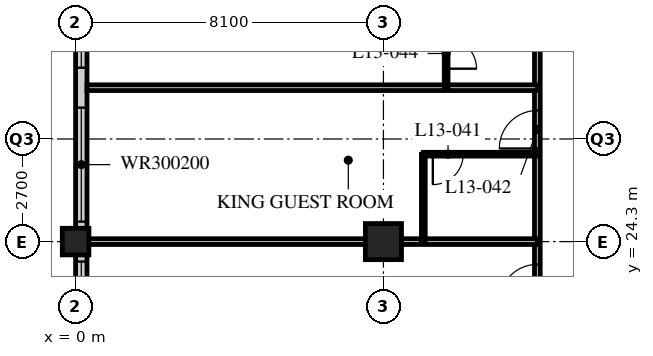
"""IFC4 building model, lengths in metres.
Left out: names, types, materials, properties, quantities, classifications, styles, units other than length and angle.
Written with IfcOpenShell. Run it as: python <this file> out.ifc"""

import sys

from ifc_helpers import new_model, si_unit, direction, frame, frame_2d, origin, origin_2d, place, context, subcontext, project, spatial, rectangle, hollow_rectangle, extrude, element, fill, save


model = new_model("IFC4")
c1 = context("Model", 3, precision=1e-05, world=origin(), true_north=direction((0.0, 1.0)))
c2 = subcontext(c1, "Body", "Model", "MODEL_VIEW")
j1 = project(units=[si_unit("LENGTHUNIT", "METRE"), si_unit("PLANEANGLEUNIT", "RADIAN")], contexts=[c1])
p1 = place(None, origin())
s1 = spatial("IfcSite", under=j1, at=p1, CompositionType="ELEMENT")
p2 = place(p1, origin())
s2 = spatial("IfcBuilding", under=s1, at=p2, CompositionType="ELEMENT")
p3 = place(p2, frame((0.0, 0.0, 56.8)))
s3 = spatial("IfcBuildingStorey", under=s2, at=p3, CompositionType="ELEMENT", Elevation=56.8)
p4 = place(p3, frame((0.0, 24.3, 0.0), z_axis=(0.0, 0.0, 1.0), x_axis=(1.0, 0.0, 0.0)))
e1 = element("IfcColumn", 1, at=p4, inside=s3, PredefinedType="COLUMN", context=c2, shape_type="SweptSolid", body=[
    extrude(hollow_rectangle(XDim=0.7, YDim=0.7, WallThickness=0.06, at=origin_2d()), origin(), (0.0, 0.0, 1.0), 3.4),
])
p5 = place(p3, frame((8.1, 24.3, 0.0), z_axis=(0.0, 0.0, 1.0), x_axis=(1.0, 0.0, 0.0)))
e2 = element("IfcColumn", 2, at=p5, inside=s3, PredefinedType="COLUMN", context=c2, shape_type="SweptSolid", body=[
    extrude(hollow_rectangle(XDim=0.95, YDim=0.95, WallThickness=0.095, at=origin_2d()), origin(), (0.0, 0.0, 1.0), 3.4),
])
p6 = place(p3, frame((0.15, 40.2, 0.0), z_axis=(0.0, 0.0, 1.0), x_axis=(0.0, -1.0, 0.0)))
e3 = element("IfcWall", 3, at=p6, inside=s3, PredefinedType="SOLIDWALL", context=c2, shape_type="SweptSolid", body=[
    extrude(rectangle(XDim=32.1, YDim=0.3, at=frame_2d((16.05, 0.0))), origin(), (0.0, 0.0, 1.0), 3.19),
])
p7 = place(p6, frame((0.225, 0.0, 0.9)))
e4 = element("IfcOpeningElement", 4, at=p7, cuts=e3, PredefinedType="OPENING", context=c2, shape_type="SweptSolid", body=[
    extrude(rectangle(XDim=3.0, YDim=2.0, at=frame_2d((1.5, 1.0))), frame((0.0, 0.16, 0.0), z_axis=(0.0, -1.0, 0.0), x_axis=(1.0, 0.0, 0.0)), (0.0, 0.0, 1.0), 0.32),
])
p8 = place(p6, frame((4.275, 0.0, 0.9)))
e5 = element("IfcOpeningElement", 5, at=p8, cuts=e3, PredefinedType="OPENING", context=c2, shape_type="SweptSolid", body=[
    extrude(rectangle(XDim=3.0, YDim=2.0, at=frame_2d((1.5, 1.0))), frame((0.0, 0.16, 0.0), z_axis=(0.0, -1.0, 0.0), x_axis=(1.0, 0.0, 0.0)), (0.0, 0.0, 1.0), 0.32),
])
p9 = place(p6, frame((8.325, 0.0, 0.9)))
e6 = element("IfcOpeningElement", 6, at=p9, cuts=e3, PredefinedType="OPENING", context=c2, shape_type="SweptSolid", body=[
    extrude(rectangle(XDim=3.0, YDim=2.0, at=frame_2d((1.5, 1.0))), frame((0.0, 0.16, 0.0), z_axis=(0.0, -1.0, 0.0), x_axis=(1.0, 0.0, 0.0)), (0.0, 0.0, 1.0), 0.32),
])
p10 = place(p6, frame((12.375, 0.0, 0.9)))
e7 = element("IfcOpeningElement", 7, at=p10, cuts=e3, PredefinedType="OPENING", context=c2, shape_type="SweptSolid", body=[
    extrude(rectangle(XDim=3.0, YDim=2.0, at=frame_2d((1.5, 1.0))), frame((0.0, 0.16, 0.0), z_axis=(0.0, -1.0, 0.0), x_axis=(1.0, 0.0, 0.0)), (0.0, 0.0, 1.0), 0.32),
])
p11 = place(p6, frame((16.425, 0.0, 0.9)))
e8 = element("IfcOpeningElement", 8, at=p11, cuts=e3, PredefinedType="OPENING", context=c2, shape_type="SweptSolid", body=[
    extrude(rectangle(XDim=3.0, YDim=2.0, at=frame_2d((1.5, 1.0))), frame((0.0, 0.16, 0.0), z_axis=(0.0, -1.0, 0.0), x_axis=(1.0, 0.0, 0.0)), (0.0, 0.0, 1.0), 0.32),
])
p12 = place(p6, frame((20.475, 0.0, 0.9)))
e9 = element("IfcOpeningElement", 9, at=p12, cuts=e3, PredefinedType="OPENING", context=c2, shape_type="SweptSolid", body=[
    extrude(rectangle(XDim=3.0, YDim=2.0, at=frame_2d((1.5, 1.0))), frame((0.0, 0.16, 0.0), z_axis=(0.0, -1.0, 0.0), x_axis=(1.0, 0.0, 0.0)), (0.0, 0.0, 1.0), 0.32),
])
p13 = place(p6, frame((24.525, 0.0, 0.9)))
e10 = element("IfcOpeningElement", 10, at=p13, cuts=e3, PredefinedType="OPENING", context=c2, shape_type="SweptSolid", body=[
    extrude(rectangle(XDim=3.0, YDim=2.0, at=frame_2d((1.5, 1.0))), frame((0.0, 0.16, 0.0), z_axis=(0.0, -1.0, 0.0), x_axis=(1.0, 0.0, 0.0)), (0.0, 0.0, 1.0), 0.32),
])
p14 = place(p6, frame((28.575, 0.0, 0.9)))
e11 = element("IfcOpeningElement", 11, at=p14, cuts=e3, PredefinedType="OPENING", context=c2, shape_type="SweptSolid", body=[
    extrude(rectangle(XDim=3.0, YDim=2.0, at=frame_2d((1.5, 1.0))), frame((0.0, 0.16, 0.0), z_axis=(0.0, -1.0, 0.0), x_axis=(1.0, 0.0, 0.0)), (0.0, 0.0, 1.0), 0.32),
])
p15 = place(p3, frame((12.15, 12.15, 0.0), z_axis=(0.0, 0.0, 1.0), x_axis=(0.0, 1.0, 0.0)))
e12 = element("IfcWall", 12, at=p15, inside=s3, PredefinedType="PARTITIONING", context=c2, shape_type="SweptSolid", body=[
    extrude(rectangle(XDim=30.15, YDim=0.15, at=frame_2d((15.075, 0.0))), origin(), (0.0, 0.0, 1.0), 3.19),
])
p16 = place(p15, frame((2.45, 0.0, 0.0)))
e13 = element("IfcOpeningElement", 13, at=p16, cuts=e12, PredefinedType="OPENING", context=c2, shape_type="SweptSolid", body=[
    extrude(rectangle(XDim=1.0, YDim=2.1, at=frame_2d((0.5, 1.05))), frame((0.0, 0.085, 0.0), z_axis=(0.0, -1.0, 0.0), x_axis=(1.0, 0.0, 0.0)), (0.0, 0.0, 1.0), 0.17),
])
p17 = place(p15, frame((6.5, 0.0, 0.0)))
e14 = element("IfcOpeningElement", 14, at=p17, cuts=e12, PredefinedType="OPENING", context=c2, shape_type="SweptSolid", body=[
    extrude(rectangle(XDim=1.0, YDim=2.1, at=frame_2d((0.5, 1.05))), frame((0.0, 0.085, 0.0), z_axis=(0.0, -1.0, 0.0), x_axis=(1.0, 0.0, 0.0)), (0.0, 0.0, 1.0), 0.17),
])
p18 = place(p15, frame((10.55, 0.0, 0.0)))
e15 = element("IfcOpeningElement", 15, at=p18, cuts=e12, PredefinedType="OPENING", context=c2, shape_type="SweptSolid", body=[
    extrude(rectangle(XDim=1.0, YDim=2.1, at=frame_2d((0.5, 1.05))), frame((0.0, 0.085, 0.0), z_axis=(0.0, -1.0, 0.0), x_axis=(1.0, 0.0, 0.0)), (0.0, 0.0, 1.0), 0.17),
])
p19 = place(p15, frame((14.6, 0.0, 0.0)))
e16 = element("IfcOpeningElement", 16, at=p19, cuts=e12, PredefinedType="OPENING", context=c2, shape_type="SweptSolid", body=[
    extrude(rectangle(XDim=1.0, YDim=2.1, at=frame_2d((0.5, 1.05))), frame((0.0, 0.085, 0.0), z_axis=(0.0, -1.0, 0.0), x_axis=(1.0, 0.0, 0.0)), (0.0, 0.0, 1.0), 0.17),
])
p20 = place(p15, frame((21.65, 0.0, 0.0)))
e17 = element("IfcOpeningElement", 17, at=p20, cuts=e12, PredefinedType="OPENING", context=c2, shape_type="SweptSolid", body=[
    extrude(rectangle(XDim=1.0, YDim=2.1, at=frame_2d((0.5, 1.05))), frame((0.0, 0.085, 0.0), z_axis=(0.0, -1.0, 0.0), x_axis=(1.0, 0.0, 0.0)), (0.0, 0.0, 1.0), 0.17),
])
p21 = place(p15, frame((26.7, 0.0, 0.0)))
e18 = element("IfcOpeningElement", 18, at=p21, cuts=e12, PredefinedType="OPENING", context=c2, shape_type="SweptSolid", body=[
    extrude(rectangle(XDim=1.0, YDim=2.1, at=frame_2d((0.5, 1.05))), frame((0.0, 0.085, 0.0), z_axis=(0.0, -1.0, 0.0), x_axis=(1.0, 0.0, 0.0)), (0.0, 0.0, 1.0), 0.17),
])
p22 = place(p3, frame((12.15, 24.3, 0.0), z_axis=(0.0, 0.0, 1.0), x_axis=(-1.0, 0.0, 0.0)))
e19 = element("IfcWall", 19, at=p22, inside=s3, PredefinedType="PARTITIONING", context=c2, shape_type="SweptSolid", body=[
    extrude(rectangle(XDim=11.85, YDim=0.15, at=frame_2d((5.925, 0.0))), origin(), (0.0, 0.0, 1.0), 2.578),
])
p23 = place(p3, frame((9.15, 24.3, 0.0), z_axis=(0.0, 0.0, 1.0), x_axis=(0.0, 1.0, 0.0)))
e20 = element("IfcWall", 20, at=p23, inside=s3, PredefinedType="PARTITIONING", context=c2, shape_type="SweptSolid", body=[
    extrude(rectangle(XDim=2.3, YDim=0.1, at=frame_2d((1.15, 0.0))), origin(), (0.0, 0.0, 1.0), 3.19),
])
p24 = place(p3, frame((12.15, 26.6, 0.0), z_axis=(0.0, 0.0, 1.0), x_axis=(-1.0, 0.0, 0.0)))
e21 = element("IfcWall", 21, at=p24, inside=s3, PredefinedType="PARTITIONING", context=c2, shape_type="SweptSolid", body=[
    extrude(rectangle(XDim=3.0, YDim=0.1, at=frame_2d((1.5, 0.0))), origin(), (0.0, 0.0, 1.0), 3.19),
])
p25 = place(p24, frame((1.95, 0.0, 0.0)))
e22 = element("IfcOpeningElement", 22, at=p25, cuts=e21, PredefinedType="OPENING", context=c2, shape_type="SweptSolid", body=[
    extrude(rectangle(XDim=0.8, YDim=2.1, at=frame_2d((0.4, 1.05))), frame((0.0, 0.06, 0.0), z_axis=(0.0, -1.0, 0.0), x_axis=(1.0, 0.0, 0.0)), (0.0, 0.0, 1.0), 0.12),
])
p26 = place(p3, frame((12.15, 28.35, 0.0), z_axis=(0.0, 0.0, 1.0), x_axis=(-1.0, 0.0, 0.0)))
e23 = element("IfcWall", 23, at=p26, inside=s3, PredefinedType="PARTITIONING", context=c2, shape_type="SweptSolid", body=[
    extrude(rectangle(XDim=11.85, YDim=0.15, at=frame_2d((5.925, 0.0))), origin(), (0.0, 0.0, 1.0), 3.19),
])
p27 = place(p3, frame((9.75, 28.35, 0.0), z_axis=(0.0, 0.0, 1.0), x_axis=(0.0, 1.0, 0.0)))
e24 = element("IfcWall", 24, at=p27, inside=s3, PredefinedType="PARTITIONING", context=c2, shape_type="SweptSolid", body=[
    extrude(rectangle(XDim=1.8, YDim=0.1, at=frame_2d((0.9, 0.0))), origin(), (0.0, 0.0, 1.0), 3.19),
])
p28 = place(p27, frame((0.5, 0.0, 0.0)))
e25 = element("IfcOpeningElement", 25, at=p28, cuts=e24, PredefinedType="OPENING", context=c2, shape_type="SweptSolid", body=[
    extrude(rectangle(XDim=0.8, YDim=2.1, at=frame_2d((0.4, 1.05))), frame((0.0, 0.06, 0.0), z_axis=(0.0, -1.0, 0.0), x_axis=(1.0, 0.0, 0.0)), (0.0, 0.0, 1.0), 0.12),
])
p29 = place(p9, origin())
e26 = element("IfcWindow", 26, at=p29, inside=s3, PartitioningType="SINGLE_PANEL", PredefinedType="WINDOW", context=c2, shape_type="SweptSolid", body=[
    extrude(rectangle(XDim=3.0, YDim=2.0, at=frame_2d((1.5, 1.0))), frame((0.0, 0.03, 0.0), z_axis=(0.0, -1.0, 0.0), x_axis=(1.0, 0.0, 0.0)), (0.0, 0.0, 1.0), 0.06),
])
fill(e6, e26)
p30 = place(p10, origin())
e27 = element("IfcWindow", 27, at=p30, inside=s3, PartitioningType="SINGLE_PANEL", PredefinedType="WINDOW", context=c2, shape_type="SweptSolid", body=[
    extrude(rectangle(XDim=3.0, YDim=2.0, at=frame_2d((1.5, 1.0))), frame((0.0, 0.03, 0.0), z_axis=(0.0, -1.0, 0.0), x_axis=(1.0, 0.0, 0.0)), (0.0, 0.0, 1.0), 0.06),
])
fill(e7, e27)
p31 = place(p11, origin())
e28 = element("IfcWindow", 28, at=p31, inside=s3, PartitioningType="SINGLE_PANEL", PredefinedType="WINDOW", context=c2, shape_type="SweptSolid", body=[
    extrude(rectangle(XDim=3.0, YDim=2.0, at=frame_2d((1.5, 1.0))), frame((0.0, 0.03, 0.0), z_axis=(0.0, -1.0, 0.0), x_axis=(1.0, 0.0, 0.0)), (0.0, 0.0, 1.0), 0.06),
])
fill(e8, e28)
p32 = place(p18, origin())
e29 = element("IfcDoor", 29, at=p32, inside=s3, OperationType="SINGLE_SWING_LEFT", PredefinedType="DOOR", context=c2, shape_type="SweptSolid", body=[
    extrude(rectangle(XDim=1.0, YDim=2.1, at=frame_2d((0.5, 1.05))), frame((0.0, 0.025, 0.0), z_axis=(0.0, -1.0, 0.0), x_axis=(1.0, 0.0, 0.0)), (0.0, 0.0, 1.0), 0.05),
])
fill(e15, e29)
p33 = place(p25, origin())
e30 = element("IfcDoor", 30, at=p33, inside=s3, OperationType="SINGLE_SWING_RIGHT", PredefinedType="DOOR", context=c2, shape_type="SweptSolid", body=[
    extrude(rectangle(XDim=0.8, YDim=2.1, at=frame_2d((0.4, 1.05))), frame((0.0, 0.025, 0.0), z_axis=(0.0, -1.0, 0.0), x_axis=(1.0, 0.0, 0.0)), (0.0, 0.0, 1.0), 0.05),
])
fill(e22, e30)
p34 = place(p19, origin())
e31 = element("IfcDoor", 31, at=p34, inside=s3, OperationType="SINGLE_SWING_LEFT", PredefinedType="DOOR", context=c2, shape_type="SweptSolid", body=[
    extrude(rectangle(XDim=1.0, YDim=2.1, at=frame_2d((0.5, 1.05))), frame((0.0, 0.025, 0.0), z_axis=(0.0, -1.0, 0.0), x_axis=(1.0, 0.0, 0.0)), (0.0, 0.0, 1.0), 0.05),
])
fill(e16, e31)
p35 = place(p28, origin())
e32 = element("IfcDoor", 32, at=p35, inside=s3, OperationType="SINGLE_SWING_RIGHT", PredefinedType="DOOR", context=c2, shape_type="SweptSolid", body=[
    extrude(rectangle(XDim=0.8, YDim=2.1, at=frame_2d((0.4, 1.05))), frame((0.0, 0.025, 0.0), z_axis=(0.0, -1.0, 0.0), x_axis=(1.0, 0.0, 0.0)), (0.0, 0.0, 1.0), 0.05),
])
fill(e25, e32)
save(model, sys.argv[1])
